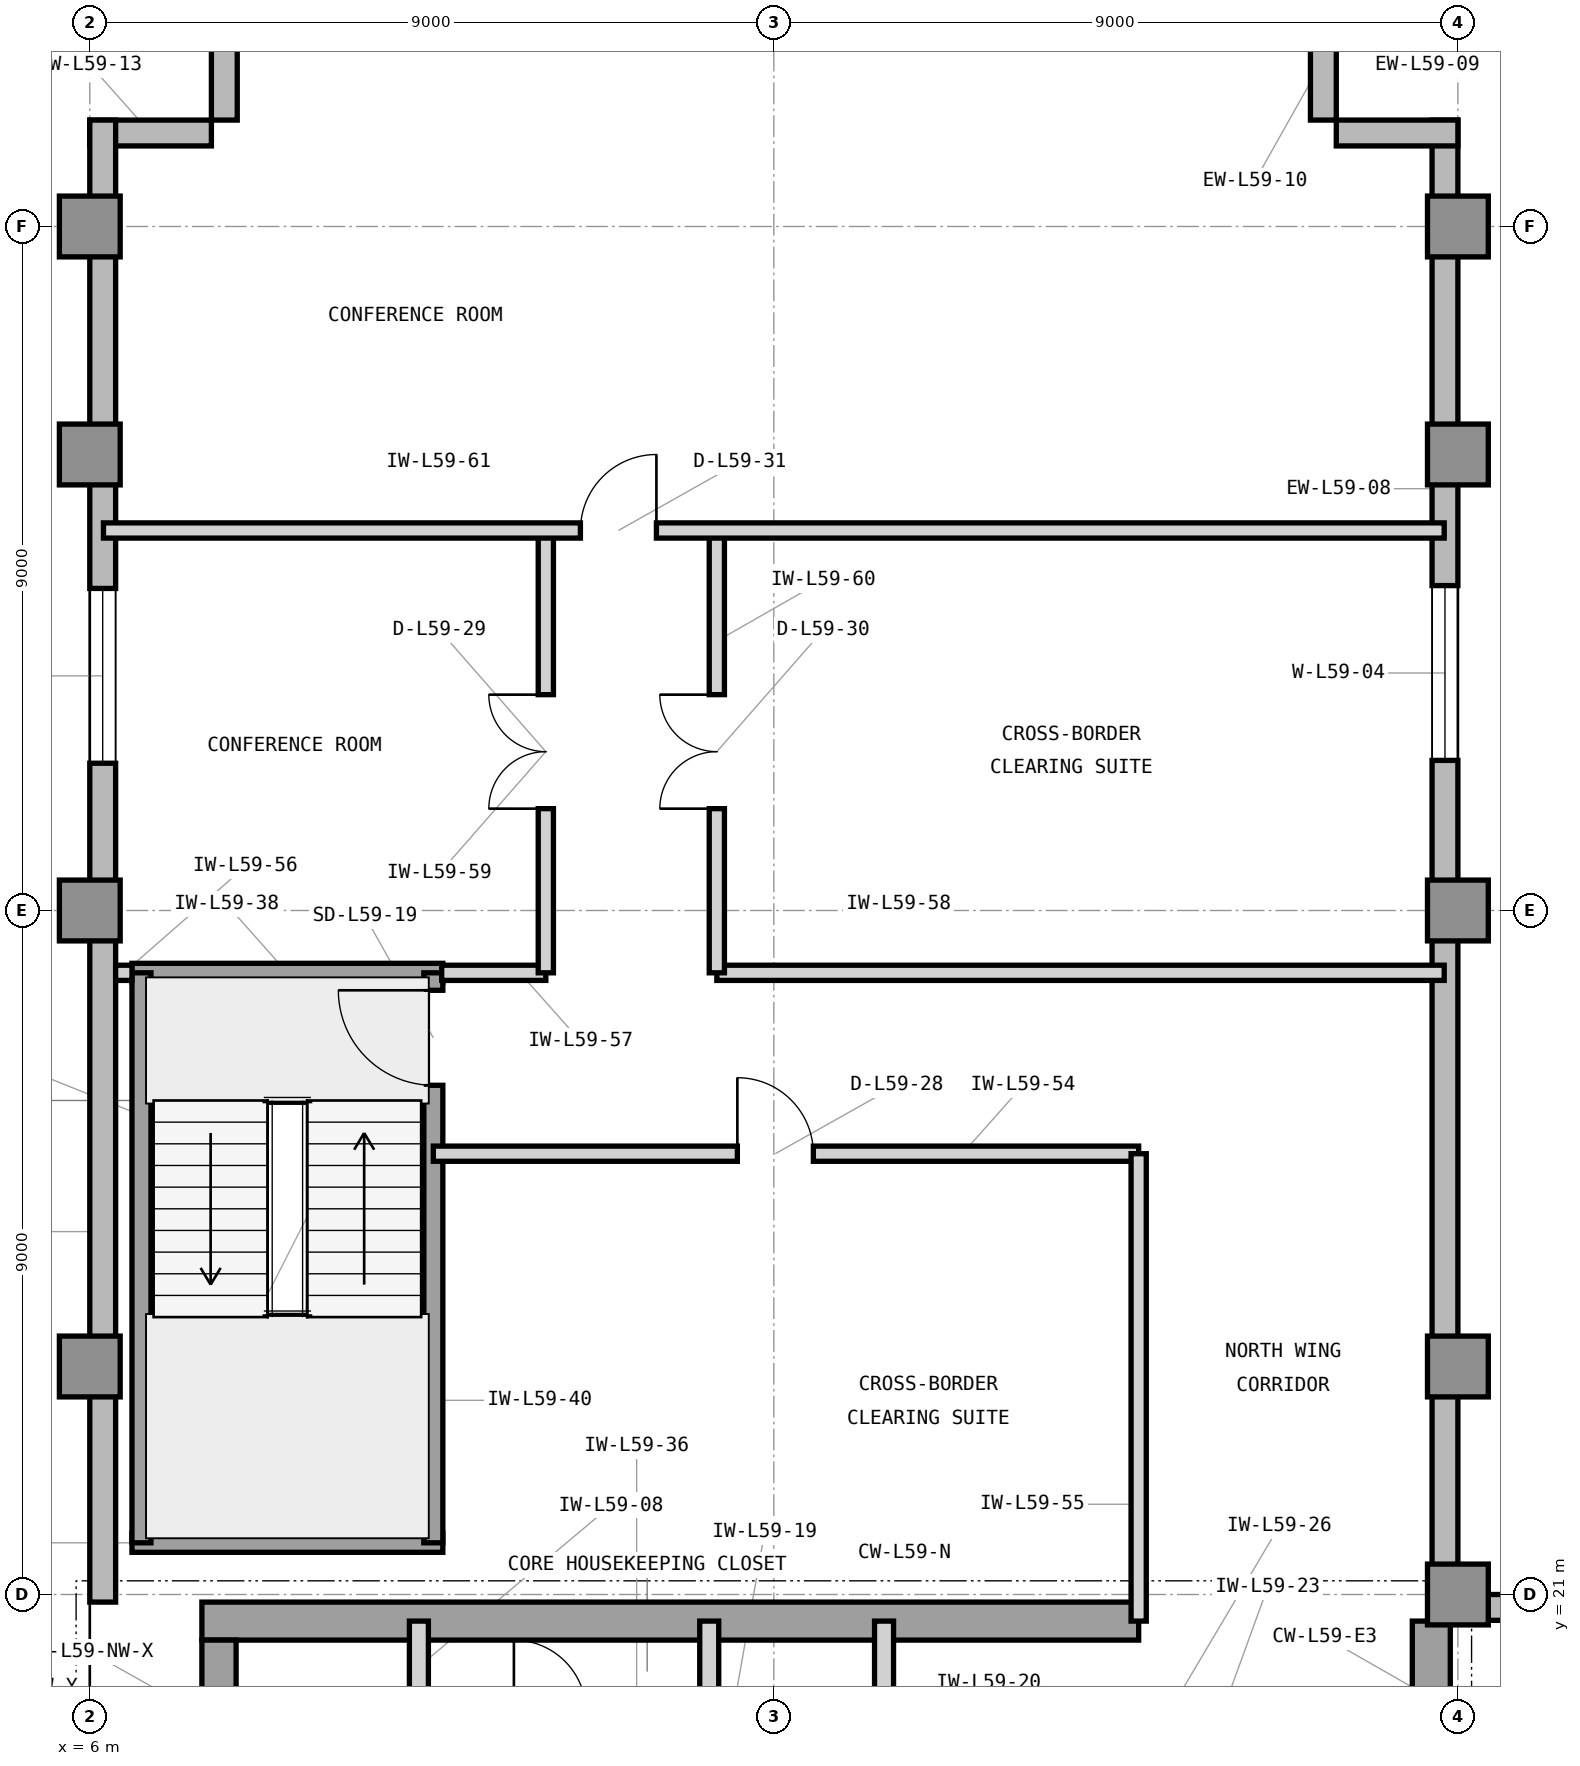
"""IFC4 building model, lengths in metres.
Left out: names, types, materials, properties, quantities, classifications, styles, units other than length and angle.
Written with IfcOpenShell. Run it as: python <this file> out.ifc"""

import sys

from ifc_helpers import new_model, si_unit, direction, frame, frame_2d, origin, origin_2d, place, context, subcontext, project, spatial, rectangle, extrude, element, fill, save


model = new_model("IFC4")
c1 = context("Model", 3, precision=1e-05, world=origin(), true_north=direction((0.0, 1.0)))
c2 = subcontext(c1, "Body", "Model", "MODEL_VIEW")
j1 = project(units=[si_unit("LENGTHUNIT", "METRE"), si_unit("PLANEANGLEUNIT", "RADIAN")], contexts=[c1])
p1 = place(None, origin())
s1 = spatial("IfcSite", under=j1, at=p1, CompositionType="ELEMENT")
p2 = place(p1, origin())
s2 = spatial("IfcBuilding", under=s1, at=p2, CompositionType="ELEMENT")
p3 = place(p2, frame((0.0, 0.0, 243.0)))
s3 = spatial("IfcBuildingStorey", under=s2, at=p3, CompositionType="ELEMENT", Elevation=243.0)
p4 = place(p3, frame((7.475, 20.65, 0.0), z_axis=(0.0, 0.0, 1.0), x_axis=(1.0, 0.0, 0.0)))
e1 = element("IfcWall", 1, at=p4, inside=s3, PredefinedType="SHEAR", context=c2, shape_type="SweptSolid", body=[
    extrude(rectangle(XDim=12.325, YDim=0.5, at=frame_2d((6.163, 0.0))), origin(), (0.0, 0.0, 1.0), 3.9),
])
p5 = place(p3, frame((23.65, 16.6, 0.0), z_axis=(0.0, 0.0, 1.0), x_axis=(0.0, 1.0, 0.0)))
e2 = element("IfcWall", 2, at=p5, inside=s3, PredefinedType="SHEAR", context=c2, shape_type="SweptSolid", body=[
    extrude(rectangle(XDim=4.05, YDim=0.5, at=frame_2d((2.025, 0.0))), origin(), (0.0, 0.0, 1.0), 3.9),
])
p6 = place(p3, frame((7.7, 19.575, 0.0), z_axis=(0.0, 0.0, 1.0), x_axis=(0.0, 1.0, 0.0)))
e3 = element("IfcWall", 3, at=p6, inside=s3, PredefinedType="SHEAR", context=c2, shape_type="SweptSolid", body=[
    extrude(rectangle(XDim=0.825, YDim=0.45, at=frame_2d((0.413, 0.0))), origin(), (0.0, 0.0, 1.0), 3.9),
])
for number, where, z_axis, x_axis in (
    (4, (24.0, 21.0, 0.0), (0.0, 0.0, 1.0), (1.0, 0.0, 0.0)),
    (5, (6.0, 24.0, 0.0), (0.0, 0.0, 1.0), (1.0, 0.0, 0.0)),
    (6, (24.0, 24.0, 0.0), (0.0, 0.0, 1.0), (1.0, 0.0, 0.0)),
    (7, (6.0, 30.0, 0.0), (0.0, 0.0, 1.0), (1.0, 0.0, 0.0)),
    (8, (24.0, 30.0, 0.0), (0.0, 0.0, 1.0), (1.0, 0.0, 0.0)),
    (9, (6.0, 36.0, 0.0), (0.0, 0.0, 1.0), (1.0, 0.0, 0.0)),
    (10, (24.0, 36.0, 0.0), (0.0, 0.0, 1.0), (1.0, 0.0, 0.0)),
    (11, (6.0, 39.0, 0.0), (0.0, 0.0, 1.0), (1.0, 0.0, 0.0)),
    (12, (24.0, 39.0, 0.0), (0.0, 0.0, 1.0), (1.0, 0.0, 0.0)),
):
    element("IfcColumn", number, at=place(p3, frame(where, z_axis=z_axis, x_axis=x_axis)), inside=s3, PredefinedType="COLUMN", context=c2, shape_type="SweptSolid", body=[
        extrude(rectangle(XDim=0.8, YDim=0.8, at=origin_2d()), origin(), (0.0, 0.0, 1.0), 3.9),
    ])
p7 = place(p3, frame((52.4, 20.83, 0.0), z_axis=(0.0, 0.0, 1.0), x_axis=(-1.0, 0.0, 0.0)))
e13 = element("IfcWall", 13, at=p7, inside=s3, PredefinedType="STANDARD", context=c2, shape_type="SweptSolid", body=[
    extrude(rectangle(XDim=28.4, YDim=0.34, at=frame_2d((14.2, 0.0))), origin(), (0.0, 0.0, 1.0), 3.7),
])
p8 = place(p7, frame((26.096, 0.0, 0.9)))
e14 = element("IfcOpeningElement", 14, at=p8, cuts=e13, PredefinedType="OPENING", context=c2, shape_type="SweptSolid", body=[
    extrude(rectangle(XDim=1.6, YDim=2.2, at=frame_2d((0.8, 1.1))), frame((0.0, 0.18, 0.0), z_axis=(0.0, -1.0, 0.0), x_axis=(1.0, 0.0, 0.0)), (0.0, 0.0, 1.0), 0.36),
])
p9 = place(p7, frame((11.375, 0.0, 0.9)))
e15 = element("IfcOpeningElement", 15, at=p9, cuts=e13, PredefinedType="OPENING", context=c2, shape_type="SweptSolid", body=[
    extrude(rectangle(XDim=2.3, YDim=2.2, at=frame_2d((1.15, 1.1))), frame((0.0, 0.18, 0.0), z_axis=(0.0, -1.0, 0.0), x_axis=(1.0, 0.0, 0.0)), (0.0, 0.0, 1.0), 0.36),
])
p10 = place(p3, frame((23.83, 21.0, 0.0), z_axis=(0.0, 0.0, 1.0), x_axis=(0.0, 1.0, 0.0)))
e16 = element("IfcWall", 16, at=p10, inside=s3, PredefinedType="STANDARD", context=c2, shape_type="SweptSolid", body=[
    extrude(rectangle(XDim=19.4, YDim=0.34, at=frame_2d((9.7, 0.0))), origin(), (0.0, 0.0, 1.0), 3.7),
])
p11 = place(p10, frame((10.975, 0.0, 0.9)))
e17 = element("IfcOpeningElement", 17, at=p11, cuts=e16, PredefinedType="OPENING", context=c2, shape_type="SweptSolid", body=[
    extrude(rectangle(XDim=2.3, YDim=2.2, at=frame_2d((1.15, 1.1))), frame((0.0, 0.18, 0.0), z_axis=(0.0, -1.0, 0.0), x_axis=(1.0, 0.0, 0.0)), (0.0, 0.0, 1.0), 0.36),
])
for number, where, z_axis, x_axis in (
    (18, (24.0, 40.23, 0.0), (0.0, 0.0, 1.0), (-1.0, 0.0, 0.0)),
    (19, (22.23, 40.4, 0.0), (0.0, 0.0, 1.0), (0.0, 1.0, 0.0)),
    (20, (7.77, 42.0, 0.0), (0.0, 0.0, 1.0), (0.0, -1.0, 0.0)),
    (21, (7.6, 40.23, 0.0), (0.0, 0.0, 1.0), (-1.0, 0.0, 0.0)),
):
    element("IfcWall", number, at=place(p3, frame(where, z_axis=z_axis, x_axis=x_axis)), inside=s3, PredefinedType="STANDARD", context=c2, shape_type="SweptSolid", body=[
        extrude(rectangle(XDim=1.6, YDim=0.34, at=frame_2d((0.8, 0.0))), origin(), (0.0, 0.0, 1.0), 3.7),
    ])
p12 = place(p3, frame((6.17, 40.4, 0.0), z_axis=(0.0, 0.0, 1.0), x_axis=(0.0, -1.0, 0.0)))
e22 = element("IfcWall", 22, at=p12, inside=s3, PredefinedType="STANDARD", context=c2, shape_type="SweptSolid", body=[
    extrude(rectangle(XDim=19.5, YDim=0.34, at=frame_2d((9.75, 0.0))), origin(), (0.0, 0.0, 1.0), 3.7),
])
p13 = place(p12, frame((6.163, 0.0, 0.9)))
e23 = element("IfcOpeningElement", 23, at=p13, cuts=e22, PredefinedType="OPENING", context=c2, shape_type="SweptSolid", body=[
    extrude(rectangle(XDim=2.3, YDim=2.2, at=frame_2d((1.15, 1.1))), frame((0.0, 0.18, 0.0), z_axis=(0.0, -1.0, 0.0), x_axis=(1.0, 0.0, 0.0)), (0.0, 0.0, 1.0), 0.36),
])
p14 = place(p3, frame((10.33, 19.45, 0.0), z_axis=(0.0, 0.0, 1.0), x_axis=(0.0, 1.0, 0.0)))
e24 = element("IfcWall", 24, at=p14, inside=s3, PredefinedType="PARTITIONING", context=c2, shape_type="SweptSolid", body=[
    extrude(rectangle(XDim=1.2, YDim=0.25, at=frame_2d((0.6, 0.0))), origin(), (0.0, 0.0, 1.0), 3.69),
])
for number, where, z_axis, x_axis in (
    (25, (14.15, 16.7, 0.0), (0.0, 0.0, 1.0), (0.0, 1.0, 0.0)),
    (26, (16.45, 16.7, 0.0), (0.0, 0.0, 1.0), (0.0, 1.0, 0.0)),
):
    element("IfcWall", number, at=place(p3, frame(where, z_axis=z_axis, x_axis=x_axis)), inside=s3, PredefinedType="PARTITIONING", context=c2, shape_type="SweptSolid", body=[
        extrude(rectangle(XDim=3.95, YDim=0.25, at=frame_2d((1.975, 0.0))), origin(), (0.0, 0.0, 1.0), 3.69),
    ])
for number, where, z_axis, x_axis in (
    (27, (6.555, 21.68, 0.0), (0.0, 0.0, 1.0), (1.0, 0.0, 0.0)),
    (28, (6.555, 29.18, 0.0), (0.0, 0.0, 1.0), (1.0, 0.0, 0.0)),
):
    element("IfcWall", number, at=place(p3, frame(where, z_axis=z_axis, x_axis=x_axis)), inside=s3, PredefinedType="SHEAR", context=c2, shape_type="SweptSolid", body=[
        extrude(rectangle(XDim=4.09, YDim=0.25, at=frame_2d((2.045, 0.0))), origin(), (0.0, 0.0, 1.0), 3.9),
    ])
p15 = place(p3, frame((6.68, 21.68, 0.0), z_axis=(0.0, 0.0, 1.0), x_axis=(0.0, 1.0, 0.0)))
e29 = element("IfcWall", 29, at=p15, inside=s3, PredefinedType="SHEAR", context=c2, shape_type="SweptSolid", body=[
    extrude(rectangle(XDim=7.5, YDim=0.25, at=frame_2d((3.75, 0.0))), origin(), (0.0, 0.0, 1.0), 3.9),
])
p16 = place(p3, frame((10.52, 21.68, 0.0), z_axis=(0.0, 0.0, 1.0), x_axis=(0.0, 1.0, 0.0)))
e30 = element("IfcWall", 30, at=p16, inside=s3, PredefinedType="SHEAR", context=c2, shape_type="SweptSolid", body=[
    extrude(rectangle(XDim=7.5, YDim=0.25, at=frame_2d((3.75, 0.0))), origin(), (0.0, 0.0, 1.0), 3.9),
])
p17 = place(p16, frame((6.02, 0.0, 0.0)))
e31 = element("IfcOpeningElement", 31, at=p17, cuts=e30, PredefinedType="OPENING", context=c2, shape_type="SweptSolid", body=[
    extrude(rectangle(XDim=1.25, YDim=2.2, at=frame_2d((0.625, 1.1))), frame((0.0, 0.135, 0.0), z_axis=(0.0, -1.0, 0.0), x_axis=(1.0, 0.0, 0.0)), (0.0, 0.0, 1.0), 0.27),
])
p18 = place(p3, frame((10.52, 26.8, 0.0), z_axis=(0.0, 0.0, 1.0), x_axis=(1.0, 0.0, 0.0)))
e32 = element("IfcWall", 32, at=p18, inside=s3, PredefinedType="PARTITIONING", context=c2, shape_type="SweptSolid", body=[
    extrude(rectangle(XDim=9.28, YDim=0.2, at=frame_2d((4.64, 0.0))), origin(), (0.0, 0.0, 1.0), 3.69),
])
p19 = place(p18, frame((4.0, 0.0, 0.0)))
e33 = element("IfcOpeningElement", 33, at=p19, cuts=e32, PredefinedType="OPENING", context=c2, shape_type="SweptSolid", body=[
    extrude(rectangle(XDim=1.0, YDim=2.15, at=frame_2d((0.5, 1.075))), frame((0.0, 0.11, 0.0), z_axis=(0.0, -1.0, 0.0), x_axis=(1.0, 0.0, 0.0)), (0.0, 0.0, 1.0), 0.22),
])
p20 = place(p3, frame((19.8, 20.65, 0.0), z_axis=(0.0, 0.0, 1.0), x_axis=(0.0, 1.0, 0.0)))
e34 = element("IfcWall", 34, at=p20, inside=s3, PredefinedType="PARTITIONING", context=c2, shape_type="SweptSolid", body=[
    extrude(rectangle(XDim=6.15, YDim=0.2, at=frame_2d((3.075, 0.0))), origin(), (0.0, 0.0, 1.0), 3.69),
])
p21 = place(p3, frame((6.34, 29.18, 0.0), z_axis=(0.0, 0.0, 1.0), x_axis=(1.0, 0.0, 0.0)))
e35 = element("IfcWall", 35, at=p21, inside=s3, PredefinedType="PARTITIONING", context=c2, shape_type="SweptSolid", body=[
    extrude(rectangle(XDim=0.215, YDim=0.2, at=frame_2d((0.107, 0.0))), origin(), (0.0, 0.0, 1.0), 3.69),
])
p22 = place(p3, frame((10.63, 29.18, 0.0), z_axis=(0.0, 0.0, 1.0), x_axis=(1.0, 0.0, 0.0)))
e36 = element("IfcWall", 36, at=p22, inside=s3, PredefinedType="PARTITIONING", context=c2, shape_type="SweptSolid", body=[
    extrude(rectangle(XDim=1.37, YDim=0.2, at=frame_2d((0.685, 0.0))), origin(), (0.0, 0.0, 1.0), 3.69),
])
p23 = place(p3, frame((14.25, 29.18, 0.0), z_axis=(0.0, 0.0, 1.0), x_axis=(1.0, 0.0, 0.0)))
e37 = element("IfcWall", 37, at=p23, inside=s3, PredefinedType="PARTITIONING", context=c2, shape_type="SweptSolid", body=[
    extrude(rectangle(XDim=9.57, YDim=0.2, at=frame_2d((4.785, 0.0))), origin(), (0.0, 0.0, 1.0), 3.69),
])
p24 = place(p3, frame((12.0, 29.18, 0.0), z_axis=(0.0, 0.0, 1.0), x_axis=(0.0, 1.0, 0.0)))
e38 = element("IfcWall", 38, at=p24, inside=s3, PredefinedType="PARTITIONING", context=c2, shape_type="SweptSolid", body=[
    extrude(rectangle(XDim=5.82, YDim=0.2, at=frame_2d((2.91, 0.0))), origin(), (0.0, 0.0, 1.0), 3.286),
])
p25 = place(p24, frame((2.16, 0.0, 0.0)))
e39 = element("IfcOpeningElement", 39, at=p25, cuts=e38, PredefinedType="OPENING", context=c2, shape_type="SweptSolid", body=[
    extrude(rectangle(XDim=1.5, YDim=2.3, at=frame_2d((0.75, 1.15))), frame((0.0, 0.11, 0.0), z_axis=(0.0, -1.0, 0.0), x_axis=(1.0, 0.0, 0.0)), (0.0, 0.0, 1.0), 0.22),
])
p26 = place(p3, frame((14.25, 29.18, 0.0), z_axis=(0.0, 0.0, 1.0), x_axis=(0.0, 1.0, 0.0)))
e40 = element("IfcWall", 40, at=p26, inside=s3, PredefinedType="PARTITIONING", context=c2, shape_type="SweptSolid", body=[
    extrude(rectangle(XDim=5.82, YDim=0.2, at=frame_2d((2.91, 0.0))), origin(), (0.0, 0.0, 1.0), 3.69),
])
p27 = place(p26, frame((2.16, 0.0, 0.0)))
e41 = element("IfcOpeningElement", 41, at=p27, cuts=e40, PredefinedType="OPENING", context=c2, shape_type="SweptSolid", body=[
    extrude(rectangle(XDim=1.5, YDim=2.3, at=frame_2d((0.75, 1.15))), frame((0.0, 0.11, 0.0), z_axis=(0.0, -1.0, 0.0), x_axis=(1.0, 0.0, 0.0)), (0.0, 0.0, 1.0), 0.22),
])
p28 = place(p3, frame((6.18, 35.0, 0.0), z_axis=(0.0, 0.0, 1.0), x_axis=(1.0, 0.0, 0.0)))
e42 = element("IfcWall", 42, at=p28, inside=s3, PredefinedType="PARTITIONING", context=c2, shape_type="SweptSolid", body=[
    extrude(rectangle(XDim=17.64, YDim=0.2, at=frame_2d((8.82, 0.0))), origin(), (0.0, 0.0, 1.0), 3.69),
])
p29 = place(p28, frame((6.275, 0.0, 0.0)))
e43 = element("IfcOpeningElement", 43, at=p29, cuts=e42, PredefinedType="OPENING", context=c2, shape_type="SweptSolid", body=[
    extrude(rectangle(XDim=1.0, YDim=2.15, at=frame_2d((0.5, 1.075))), frame((0.0, 0.11, 0.0), z_axis=(0.0, -1.0, 0.0), x_axis=(1.0, 0.0, 0.0)), (0.0, 0.0, 1.0), 0.22),
])
p30 = place(p11, origin())
e44 = element("IfcWindow", 44, at=p30, inside=s3, PartitioningType="SINGLE_PANEL", PredefinedType="WINDOW", context=c2, shape_type="SweptSolid", body=[
    extrude(rectangle(XDim=2.3, YDim=2.2, at=frame_2d((1.15, 1.1))), frame((0.0, 0.11, 0.0), z_axis=(0.0, -1.0, 0.0), x_axis=(1.0, 0.0, 0.0)), (0.0, 0.0, 1.0), 0.06),
])
fill(e17, e44)
p31 = place(p13, origin())
e45 = element("IfcWindow", 45, at=p31, inside=s3, PartitioningType="SINGLE_PANEL", PredefinedType="WINDOW", context=c2, shape_type="SweptSolid", body=[
    extrude(rectangle(XDim=2.3, YDim=2.2, at=frame_2d((1.15, 1.1))), frame((0.0, 0.11, 0.0), z_axis=(0.0, -1.0, 0.0), x_axis=(1.0, 0.0, 0.0)), (0.0, 0.0, 1.0), 0.06),
])
fill(e23, e45)
p32 = place(p17, origin())
e46 = element("IfcDoor", 46, at=p32, inside=s3, OperationType="SINGLE_SWING_RIGHT", PredefinedType="DOOR", context=c2, shape_type="SweptSolid", body=[
    extrude(rectangle(XDim=1.25, YDim=2.2, at=frame_2d((0.625, 1.1))), frame((0.0, 0.025, 0.0), z_axis=(0.0, -1.0, 0.0), x_axis=(1.0, 0.0, 0.0)), (0.0, 0.0, 1.0), 0.05),
])
fill(e31, e46)
p33 = place(p19, origin())
e47 = element("IfcDoor", 47, at=p33, inside=s3, OperationType="SINGLE_SWING_LEFT", PredefinedType="DOOR", context=c2, shape_type="SweptSolid", body=[
    extrude(rectangle(XDim=1.0, YDim=2.15, at=frame_2d((0.5, 1.075))), frame((0.0, 0.025, 0.0), z_axis=(0.0, -1.0, 0.0), x_axis=(1.0, 0.0, 0.0)), (0.0, 0.0, 1.0), 0.05),
])
fill(e33, e47)
p34 = place(p25, origin())
e48 = element("IfcDoor", 48, at=p34, inside=s3, OperationType="DOUBLE_DOOR_SINGLE_SWING", PredefinedType="DOOR", context=c2, shape_type="SweptSolid", body=[
    extrude(rectangle(XDim=1.5, YDim=2.3, at=frame_2d((0.75, 1.15))), frame((0.0, 0.025, 0.0), z_axis=(0.0, -1.0, 0.0), x_axis=(1.0, 0.0, 0.0)), (0.0, 0.0, 1.0), 0.05),
])
fill(e39, e48)
p35 = place(p27, origin())
e49 = element("IfcDoor", 49, at=p35, inside=s3, OperationType="DOUBLE_DOOR_SINGLE_SWING", PredefinedType="DOOR", context=c2, shape_type="SweptSolid", body=[
    extrude(rectangle(XDim=1.5, YDim=2.3, at=frame_2d((0.75, 1.15))), frame((0.0, 0.025, 0.0), z_axis=(0.0, -1.0, 0.0), x_axis=(1.0, 0.0, 0.0)), (0.0, 0.0, 1.0), 0.05),
])
fill(e41, e49)
p36 = place(p29, origin())
e50 = element("IfcDoor", 50, at=p36, inside=s3, OperationType="SINGLE_SWING_RIGHT", PredefinedType="DOOR", context=c2, shape_type="SweptSolid", body=[
    extrude(rectangle(XDim=1.0, YDim=2.15, at=frame_2d((0.5, 1.075))), frame((0.0, 0.025, 0.0), z_axis=(0.0, -1.0, 0.0), x_axis=(1.0, 0.0, 0.0)), (0.0, 0.0, 1.0), 0.05),
])
fill(e43, e50)
save(model, sys.argv[1])
